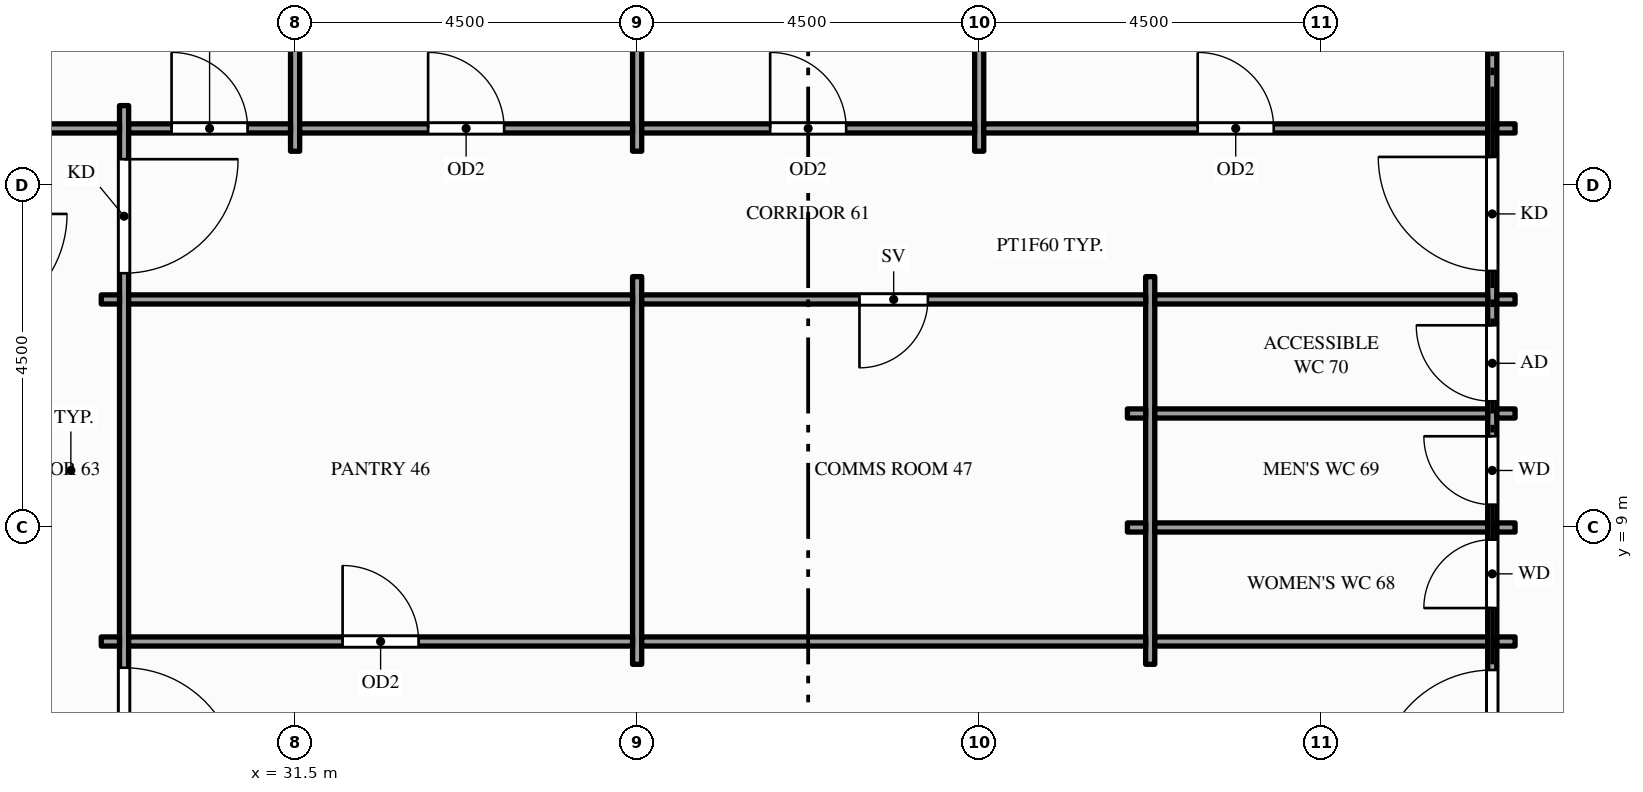
"""IFC4 building model, lengths in metres.
Left out: names, types, materials, properties, quantities, classifications, styles, units other than length and angle.
Written with IfcOpenShell. Run it as: python <this file> out.ifc"""

import sys

from ifc_helpers import new_model, si_unit, direction, frame, frame_2d, origin, place, context, subcontext, project, spatial, rectangle, extrude, element, fill, save


model = new_model("IFC4")
c1 = context("Model", 3, precision=1e-05, world=origin(), true_north=direction((0.0, 1.0)))
c2 = subcontext(c1, "Body", "Model", "MODEL_VIEW")
j1 = project(units=[si_unit("LENGTHUNIT", "METRE"), si_unit("PLANEANGLEUNIT", "RADIAN")], contexts=[c1])
p1 = place(None, origin())
s1 = spatial("IfcSite", under=j1, at=p1, CompositionType="ELEMENT")
p2 = place(p1, origin())
s2 = spatial("IfcBuilding", under=s1, at=p2, CompositionType="ELEMENT")
p3 = place(p2, frame((0.0, 0.0, 207.0)))
s3 = spatial("IfcBuildingStorey", under=s2, at=p3, CompositionType="ELEMENT", Elevation=207.0)
p4 = place(p3, frame((29.25, 4.95, 0.0), z_axis=(0.0, 0.0, 1.0), x_axis=(0.0, 1.0, 0.0)))
e1 = element("IfcWall", 1, at=p4, inside=s3, PredefinedType="PARTITIONING", context=c2, shape_type="SweptSolid", body=[
    extrude(rectangle(XDim=9.6, YDim=0.12, at=frame_2d((4.8, 0.0))), origin(), (0.0, 0.0, 1.0), 2.87),
])
p5 = place(p4, frame((0.705, 0.0, 0.0)))
e2 = element("IfcOpeningElement", 2, at=p5, cuts=e1, PredefinedType="OPENING", context=c2, shape_type="SweptSolid", body=[
    extrude(rectangle(XDim=1.5, YDim=2.1, at=frame_2d((0.75, 1.05))), frame((0.0, 0.07, 0.0), z_axis=(0.0, -1.0, 0.0), x_axis=(1.0, 0.0, 0.0)), (0.0, 0.0, 1.0), 0.14),
])
p6 = place(p4, frame((7.395, 0.0, 0.0)))
e3 = element("IfcOpeningElement", 3, at=p6, cuts=e1, PredefinedType="OPENING", context=c2, shape_type="SweptSolid", body=[
    extrude(rectangle(XDim=1.5, YDim=2.1, at=frame_2d((0.75, 1.05))), frame((0.0, 0.07, 0.0), z_axis=(0.0, -1.0, 0.0), x_axis=(1.0, 0.0, 0.0)), (0.0, 0.0, 1.0), 0.14),
])
p7 = place(p3, frame((31.5, 13.95, 0.0), z_axis=(0.0, 0.0, 1.0), x_axis=(0.0, 1.0, 0.0)))
e4 = element("IfcWall", 4, at=p7, inside=s3, PredefinedType="PARTITIONING", context=c2, shape_type="SweptSolid", body=[
    extrude(rectangle(XDim=6.9, YDim=0.12, at=frame_2d((3.45, 0.0))), origin(), (0.0, 0.0, 1.0), 2.87),
])
p8 = place(p3, frame((36.0, 7.2, 0.0), z_axis=(0.0, 0.0, 1.0), x_axis=(0.0, 1.0, 0.0)))
e5 = element("IfcWall", 5, at=p8, inside=s3, PredefinedType="PARTITIONING", context=c2, shape_type="SweptSolid", body=[
    extrude(rectangle(XDim=5.1, YDim=0.12, at=frame_2d((2.55, 0.0))), origin(), (0.0, 0.0, 1.0), 2.87),
])
for number, where, z_axis, x_axis in (
    (6, (36.0, 13.95, 0.0), (0.0, 0.0, 1.0), (0.0, 1.0, 0.0)),
    (7, (40.5, 13.95, 0.0), (0.0, 0.0, 1.0), (0.0, 1.0, 0.0)),
):
    element("IfcWall", number, at=place(p3, frame(where, z_axis=z_axis, x_axis=x_axis)), inside=s3, PredefinedType="PARTITIONING", context=c2, shape_type="SweptSolid", body=[
        extrude(rectangle(XDim=6.9, YDim=0.12, at=frame_2d((3.45, 0.0))), origin(), (0.0, 0.0, 1.0), 2.87),
    ])
p9 = place(p3, frame((42.75, 7.2, 0.0), z_axis=(0.0, 0.0, 1.0), x_axis=(0.0, 1.0, 0.0)))
e8 = element("IfcWall", 8, at=p9, inside=s3, PredefinedType="PARTITIONING", context=c2, shape_type="SweptSolid", body=[
    extrude(rectangle(XDim=5.1, YDim=0.12, at=frame_2d((2.55, 0.0))), origin(), (0.0, 0.0, 1.0), 2.87),
])
p10 = place(p3, frame((47.25, -1.35, 0.0), z_axis=(0.0, 0.0, 1.0), x_axis=(0.0, 1.0, 0.0)))
e9 = element("IfcWall", 9, at=p10, inside=s3, PredefinedType="PARTITIONING", context=c2, shape_type="SweptSolid", body=[
    extrude(rectangle(XDim=22.2, YDim=0.12, at=frame_2d((11.1, 0.0))), origin(), (0.0, 0.0, 1.0), 2.87),
])
p11 = place(p10, frame((6.975, 0.0, 0.0)))
e10 = element("IfcOpeningElement", 10, at=p11, cuts=e9, PredefinedType="OPENING", context=c2, shape_type="SweptSolid", body=[
    extrude(rectangle(XDim=1.5, YDim=2.1, at=frame_2d((0.75, 1.05))), frame((0.0, 0.07, 0.0), z_axis=(0.0, -1.0, 0.0), x_axis=(1.0, 0.0, 0.0)), (0.0, 0.0, 1.0), 0.14),
])
p12 = place(p10, frame((13.725, 0.0, 0.0)))
e11 = element("IfcOpeningElement", 11, at=p12, cuts=e9, PredefinedType="OPENING", context=c2, shape_type="SweptSolid", body=[
    extrude(rectangle(XDim=1.5, YDim=2.1, at=frame_2d((0.75, 1.05))), frame((0.0, 0.07, 0.0), z_axis=(0.0, -1.0, 0.0), x_axis=(1.0, 0.0, 0.0)), (0.0, 0.0, 1.0), 0.14),
])
p13 = place(p10, frame((9.29, 0.0, 0.0)))
e12 = element("IfcOpeningElement", 12, at=p13, cuts=e9, PredefinedType="OPENING", context=c2, shape_type="SweptSolid", body=[
    extrude(rectangle(XDim=0.9, YDim=2.1, at=frame_2d((0.45, 1.05))), frame((0.0, 0.07, 0.0), z_axis=(0.0, -1.0, 0.0), x_axis=(1.0, 0.0, 0.0)), (0.0, 0.0, 1.0), 0.14),
])
p14 = place(p10, frame((10.65, 0.0, 0.0)))
e13 = element("IfcOpeningElement", 13, at=p14, cuts=e9, PredefinedType="OPENING", context=c2, shape_type="SweptSolid", body=[
    extrude(rectangle(XDim=0.9, YDim=2.1, at=frame_2d((0.45, 1.05))), frame((0.0, 0.07, 0.0), z_axis=(0.0, -1.0, 0.0), x_axis=(1.0, 0.0, 0.0)), (0.0, 0.0, 1.0), 0.14),
])
p15 = place(p10, frame((12.01, 0.0, 0.0)))
e14 = element("IfcOpeningElement", 14, at=p15, cuts=e9, PredefinedType="OPENING", context=c2, shape_type="SweptSolid", body=[
    extrude(rectangle(XDim=1.0, YDim=2.1, at=frame_2d((0.5, 1.05))), frame((0.0, 0.07, 0.0), z_axis=(0.0, -1.0, 0.0), x_axis=(1.0, 0.0, 0.0)), (0.0, 0.0, 1.0), 0.14),
])
p16 = place(p3, frame((28.95, 7.5, 0.0), z_axis=(0.0, 0.0, 1.0), x_axis=(1.0, 0.0, 0.0)))
e15 = element("IfcWall", 15, at=p16, inside=s3, PredefinedType="PARTITIONING", context=c2, shape_type="SweptSolid", body=[
    extrude(rectangle(XDim=0.24, YDim=0.12, at=frame_2d((0.12, 0.0))), origin(), (0.0, 0.0, 1.0), 2.87),
])
p17 = place(p3, frame((29.31, 7.5, 0.0), z_axis=(0.0, 0.0, 1.0), x_axis=(1.0, 0.0, 0.0)))
e16 = element("IfcWall", 16, at=p17, inside=s3, PredefinedType="PARTITIONING", context=c2, shape_type="SweptSolid", body=[
    extrude(rectangle(XDim=6.63, YDim=0.12, at=frame_2d((3.315, 0.0))), origin(), (0.0, 0.0, 1.0), 2.87),
])
p18 = place(p17, frame((2.815, 0.0, 0.0)))
e17 = element("IfcOpeningElement", 17, at=p18, cuts=e16, PredefinedType="OPENING", context=c2, shape_type="SweptSolid", body=[
    extrude(rectangle(XDim=1.0, YDim=2.1, at=frame_2d((0.5, 1.05))), frame((0.0, 0.07, 0.0), z_axis=(0.0, -1.0, 0.0), x_axis=(1.0, 0.0, 0.0)), (0.0, 0.0, 1.0), 0.14),
])
p19 = place(p3, frame((36.06, 7.5, 0.0), z_axis=(0.0, 0.0, 1.0), x_axis=(1.0, 0.0, 0.0)))
e18 = element("IfcWall", 18, at=p19, inside=s3, PredefinedType="PARTITIONING", context=c2, shape_type="SweptSolid", body=[
    extrude(rectangle(XDim=6.63, YDim=0.12, at=frame_2d((3.315, 0.0))), origin(), (0.0, 0.0, 1.0), 2.87),
])
p20 = place(p3, frame((42.81, 7.5, 0.0), z_axis=(0.0, 0.0, 1.0), x_axis=(1.0, 0.0, 0.0)))
e19 = element("IfcWall", 19, at=p20, inside=s3, PredefinedType="PARTITIONING", context=c2, shape_type="SweptSolid", body=[
    extrude(rectangle(XDim=4.38, YDim=0.12, at=frame_2d((2.19, 0.0))), origin(), (0.0, 0.0, 1.0), 2.87),
])
for number, where, z_axis, x_axis in (
    (20, (47.31, 7.5, 0.0), (0.0, 0.0, 1.0), (1.0, 0.0, 0.0)),
    (21, (42.45, 9.0, 0.0), (0.0, 0.0, 1.0), (1.0, 0.0, 0.0)),
):
    element("IfcWall", number, at=place(p3, frame(where, z_axis=z_axis, x_axis=x_axis)), inside=s3, PredefinedType="PARTITIONING", context=c2, shape_type="SweptSolid", body=[
        extrude(rectangle(XDim=0.24, YDim=0.12, at=frame_2d((0.12, 0.0))), origin(), (0.0, 0.0, 1.0), 2.87),
    ])
p21 = place(p3, frame((42.81, 9.0, 0.0), z_axis=(0.0, 0.0, 1.0), x_axis=(1.0, 0.0, 0.0)))
e22 = element("IfcWall", 22, at=p21, inside=s3, PredefinedType="PARTITIONING", context=c2, shape_type="SweptSolid", body=[
    extrude(rectangle(XDim=4.38, YDim=0.12, at=frame_2d((2.19, 0.0))), origin(), (0.0, 0.0, 1.0), 2.87),
])
for number, where, z_axis, x_axis in (
    (23, (47.31, 9.0, 0.0), (0.0, 0.0, 1.0), (1.0, 0.0, 0.0)),
    (24, (42.45, 10.5, 0.0), (0.0, 0.0, 1.0), (1.0, 0.0, 0.0)),
):
    element("IfcWall", number, at=place(p3, frame(where, z_axis=z_axis, x_axis=x_axis)), inside=s3, PredefinedType="PARTITIONING", context=c2, shape_type="SweptSolid", body=[
        extrude(rectangle(XDim=0.24, YDim=0.12, at=frame_2d((0.12, 0.0))), origin(), (0.0, 0.0, 1.0), 2.87),
    ])
p22 = place(p3, frame((42.81, 10.5, 0.0), z_axis=(0.0, 0.0, 1.0), x_axis=(1.0, 0.0, 0.0)))
e25 = element("IfcWall", 25, at=p22, inside=s3, PredefinedType="PARTITIONING", context=c2, shape_type="SweptSolid", body=[
    extrude(rectangle(XDim=4.38, YDim=0.12, at=frame_2d((2.19, 0.0))), origin(), (0.0, 0.0, 1.0), 2.87),
])
for number, where, z_axis, x_axis in (
    (26, (47.31, 10.5, 0.0), (0.0, 0.0, 1.0), (1.0, 0.0, 0.0)),
    (27, (28.95, 12.0, 0.0), (0.0, 0.0, 1.0), (1.0, 0.0, 0.0)),
):
    element("IfcWall", number, at=place(p3, frame(where, z_axis=z_axis, x_axis=x_axis)), inside=s3, PredefinedType="PARTITIONING", context=c2, shape_type="SweptSolid", body=[
        extrude(rectangle(XDim=0.24, YDim=0.12, at=frame_2d((0.12, 0.0))), origin(), (0.0, 0.0, 1.0), 2.87),
    ])
p23 = place(p3, frame((29.31, 12.0, 0.0), z_axis=(0.0, 0.0, 1.0), x_axis=(1.0, 0.0, 0.0)))
e28 = element("IfcWall", 28, at=p23, inside=s3, PredefinedType="PARTITIONING", context=c2, shape_type="SweptSolid", body=[
    extrude(rectangle(XDim=6.63, YDim=0.12, at=frame_2d((3.315, 0.0))), origin(), (0.0, 0.0, 1.0), 2.87),
])
p24 = place(p3, frame((36.06, 12.0, 0.0), z_axis=(0.0, 0.0, 1.0), x_axis=(1.0, 0.0, 0.0)))
e29 = element("IfcWall", 29, at=p24, inside=s3, PredefinedType="PARTITIONING", context=c2, shape_type="SweptSolid", body=[
    extrude(rectangle(XDim=6.63, YDim=0.12, at=frame_2d((3.315, 0.0))), origin(), (0.0, 0.0, 1.0), 2.87),
])
p25 = place(p24, frame((2.865, 0.0, 0.0)))
e30 = element("IfcOpeningElement", 30, at=p25, cuts=e29, PredefinedType="OPENING", context=c2, shape_type="SweptSolid", body=[
    extrude(rectangle(XDim=0.9, YDim=2.1, at=frame_2d((0.45, 1.05))), frame((0.0, 0.07, 0.0), z_axis=(0.0, -1.0, 0.0), x_axis=(1.0, 0.0, 0.0)), (0.0, 0.0, 1.0), 0.14),
])
p26 = place(p3, frame((42.81, 12.0, 0.0), z_axis=(0.0, 0.0, 1.0), x_axis=(1.0, 0.0, 0.0)))
e31 = element("IfcWall", 31, at=p26, inside=s3, PredefinedType="PARTITIONING", context=c2, shape_type="SweptSolid", body=[
    extrude(rectangle(XDim=4.38, YDim=0.12, at=frame_2d((2.19, 0.0))), origin(), (0.0, 0.0, 1.0), 2.87),
])
p27 = place(p3, frame((47.31, 12.0, 0.0), z_axis=(0.0, 0.0, 1.0), x_axis=(1.0, 0.0, 0.0)))
e32 = element("IfcWall", 32, at=p27, inside=s3, PredefinedType="PARTITIONING", context=c2, shape_type="SweptSolid", body=[
    extrude(rectangle(XDim=0.24, YDim=0.12, at=frame_2d((0.12, 0.0))), origin(), (0.0, 0.0, 1.0), 2.87),
])
p28 = place(p3, frame((27.06, 14.25, 0.0), z_axis=(0.0, 0.0, 1.0), x_axis=(1.0, 0.0, 0.0)))
e33 = element("IfcWall", 33, at=p28, inside=s3, PredefinedType="PARTITIONING", context=c2, shape_type="SweptSolid", body=[
    extrude(rectangle(XDim=2.13, YDim=0.12, at=frame_2d((1.065, 0.0))), origin(), (0.0, 0.0, 1.0), 2.87),
])
p29 = place(p3, frame((29.31, 14.25, 0.0), z_axis=(0.0, 0.0, 1.0), x_axis=(1.0, 0.0, 0.0)))
e34 = element("IfcWall", 34, at=p29, inside=s3, PredefinedType="PARTITIONING", context=c2, shape_type="SweptSolid", body=[
    extrude(rectangle(XDim=2.13, YDim=0.12, at=frame_2d((1.065, 0.0))), origin(), (0.0, 0.0, 1.0), 2.87),
])
p30 = place(p29, frame((0.565, 0.0, 0.0)))
e35 = element("IfcOpeningElement", 35, at=p30, cuts=e34, PredefinedType="OPENING", context=c2, shape_type="SweptSolid", body=[
    extrude(rectangle(XDim=1.0, YDim=2.1, at=frame_2d((0.5, 1.05))), frame((0.0, 0.07, 0.0), z_axis=(0.0, -1.0, 0.0), x_axis=(1.0, 0.0, 0.0)), (0.0, 0.0, 1.0), 0.14),
])
p31 = place(p3, frame((31.56, 14.25, 0.0), z_axis=(0.0, 0.0, 1.0), x_axis=(1.0, 0.0, 0.0)))
e36 = element("IfcWall", 36, at=p31, inside=s3, PredefinedType="PARTITIONING", context=c2, shape_type="SweptSolid", body=[
    extrude(rectangle(XDim=4.38, YDim=0.12, at=frame_2d((2.19, 0.0))), origin(), (0.0, 0.0, 1.0), 2.87),
])
p32 = place(p31, frame((1.69, 0.0, 0.0)))
e37 = element("IfcOpeningElement", 37, at=p32, cuts=e36, PredefinedType="OPENING", context=c2, shape_type="SweptSolid", body=[
    extrude(rectangle(XDim=1.0, YDim=2.1, at=frame_2d((0.5, 1.05))), frame((0.0, 0.07, 0.0), z_axis=(0.0, -1.0, 0.0), x_axis=(1.0, 0.0, 0.0)), (0.0, 0.0, 1.0), 0.14),
])
p33 = place(p3, frame((36.06, 14.25, 0.0), z_axis=(0.0, 0.0, 1.0), x_axis=(1.0, 0.0, 0.0)))
e38 = element("IfcWall", 38, at=p33, inside=s3, PredefinedType="PARTITIONING", context=c2, shape_type="SweptSolid", body=[
    extrude(rectangle(XDim=4.38, YDim=0.12, at=frame_2d((2.19, 0.0))), origin(), (0.0, 0.0, 1.0), 2.87),
])
p34 = place(p33, frame((1.69, 0.0, 0.0)))
e39 = element("IfcOpeningElement", 39, at=p34, cuts=e38, PredefinedType="OPENING", context=c2, shape_type="SweptSolid", body=[
    extrude(rectangle(XDim=1.0, YDim=2.1, at=frame_2d((0.5, 1.05))), frame((0.0, 0.07, 0.0), z_axis=(0.0, -1.0, 0.0), x_axis=(1.0, 0.0, 0.0)), (0.0, 0.0, 1.0), 0.14),
])
p35 = place(p3, frame((40.56, 14.25, 0.0), z_axis=(0.0, 0.0, 1.0), x_axis=(1.0, 0.0, 0.0)))
e40 = element("IfcWall", 40, at=p35, inside=s3, PredefinedType="PARTITIONING", context=c2, shape_type="SweptSolid", body=[
    extrude(rectangle(XDim=6.63, YDim=0.12, at=frame_2d((3.315, 0.0))), origin(), (0.0, 0.0, 1.0), 2.87),
])
p36 = place(p35, frame((2.815, 0.0, 0.0)))
e41 = element("IfcOpeningElement", 41, at=p36, cuts=e40, PredefinedType="OPENING", context=c2, shape_type="SweptSolid", body=[
    extrude(rectangle(XDim=1.0, YDim=2.1, at=frame_2d((0.5, 1.05))), frame((0.0, 0.07, 0.0), z_axis=(0.0, -1.0, 0.0), x_axis=(1.0, 0.0, 0.0)), (0.0, 0.0, 1.0), 0.14),
])
p37 = place(p3, frame((47.31, 14.25, 0.0), z_axis=(0.0, 0.0, 1.0), x_axis=(1.0, 0.0, 0.0)))
e42 = element("IfcWall", 42, at=p37, inside=s3, PredefinedType="PARTITIONING", context=c2, shape_type="SweptSolid", body=[
    extrude(rectangle(XDim=0.24, YDim=0.12, at=frame_2d((0.12, 0.0))), origin(), (0.0, 0.0, 1.0), 2.87),
])
p38 = place(p5, origin())
e43 = element("IfcDoor", 43, at=p38, inside=s3, OperationType="SINGLE_SWING_LEFT", PredefinedType="DOOR", context=c2, shape_type="SweptSolid", body=[
    extrude(rectangle(XDim=1.5, YDim=2.1, at=frame_2d((0.75, 1.05))), frame((0.0, 0.025, 0.0), z_axis=(0.0, -1.0, 0.0), x_axis=(1.0, 0.0, 0.0)), (0.0, 0.0, 1.0), 0.05),
])
fill(e2, e43)
p39 = place(p6, origin())
e44 = element("IfcDoor", 44, at=p39, inside=s3, OperationType="SINGLE_SWING_RIGHT", PredefinedType="DOOR", context=c2, shape_type="SweptSolid", body=[
    extrude(rectangle(XDim=1.5, YDim=2.1, at=frame_2d((0.75, 1.05))), frame((0.0, 0.025, 0.0), z_axis=(0.0, -1.0, 0.0), x_axis=(1.0, 0.0, 0.0)), (0.0, 0.0, 1.0), 0.05),
])
fill(e3, e44)
p40 = place(p11, origin())
e45 = element("IfcDoor", 45, at=p40, inside=s3, OperationType="SINGLE_SWING_LEFT", PredefinedType="DOOR", context=c2, shape_type="SweptSolid", body=[
    extrude(rectangle(XDim=1.5, YDim=2.1, at=frame_2d((0.75, 1.05))), frame((0.0, 0.025, 0.0), z_axis=(0.0, -1.0, 0.0), x_axis=(1.0, 0.0, 0.0)), (0.0, 0.0, 1.0), 0.05),
])
fill(e10, e45)
p41 = place(p12, origin())
e46 = element("IfcDoor", 46, at=p41, inside=s3, OperationType="SINGLE_SWING_RIGHT", PredefinedType="DOOR", context=c2, shape_type="SweptSolid", body=[
    extrude(rectangle(XDim=1.5, YDim=2.1, at=frame_2d((0.75, 1.05))), frame((0.0, 0.025, 0.0), z_axis=(0.0, -1.0, 0.0), x_axis=(1.0, 0.0, 0.0)), (0.0, 0.0, 1.0), 0.05),
])
fill(e11, e46)
p42 = place(p18, origin())
e47 = element("IfcDoor", 47, at=p42, inside=s3, OperationType="SINGLE_SWING_LEFT", PredefinedType="DOOR", context=c2, shape_type="SweptSolid", body=[
    extrude(rectangle(XDim=1.0, YDim=2.1, at=frame_2d((0.5, 1.05))), frame((0.0, 0.025, 0.0), z_axis=(0.0, -1.0, 0.0), x_axis=(1.0, 0.0, 0.0)), (0.0, 0.0, 1.0), 0.05),
])
fill(e17, e47)
p43 = place(p25, origin())
e48 = element("IfcDoor", 48, at=p43, inside=s3, OperationType="SINGLE_SWING_LEFT", PredefinedType="DOOR", context=c2, shape_type="SweptSolid", body=[
    extrude(rectangle(XDim=0.9, YDim=2.1, at=frame_2d((0.45, 1.05))), frame((0.0, 0.025, 0.0), z_axis=(0.0, -1.0, 0.0), x_axis=(1.0, 0.0, 0.0)), (0.0, 0.0, 1.0), 0.05),
])
fill(e30, e48)
p44 = place(p13, origin())
e49 = element("IfcDoor", 49, at=p44, inside=s3, OperationType="SINGLE_SWING_LEFT", PredefinedType="DOOR", context=c2, shape_type="SweptSolid", body=[
    extrude(rectangle(XDim=0.9, YDim=2.1, at=frame_2d((0.45, 1.05))), frame((0.0, 0.025, 0.0), z_axis=(0.0, -1.0, 0.0), x_axis=(1.0, 0.0, 0.0)), (0.0, 0.0, 1.0), 0.05),
])
fill(e12, e49)
p45 = place(p14, origin())
e50 = element("IfcDoor", 50, at=p45, inside=s3, OperationType="SINGLE_SWING_RIGHT", PredefinedType="DOOR", context=c2, shape_type="SweptSolid", body=[
    extrude(rectangle(XDim=0.9, YDim=2.1, at=frame_2d((0.45, 1.05))), frame((0.0, 0.025, 0.0), z_axis=(0.0, -1.0, 0.0), x_axis=(1.0, 0.0, 0.0)), (0.0, 0.0, 1.0), 0.05),
])
fill(e13, e50)
p46 = place(p15, origin())
e51 = element("IfcDoor", 51, at=p46, inside=s3, OperationType="SINGLE_SWING_RIGHT", PredefinedType="DOOR", context=c2, shape_type="SweptSolid", body=[
    extrude(rectangle(XDim=1.0, YDim=2.1, at=frame_2d((0.5, 1.05))), frame((0.0, 0.025, 0.0), z_axis=(0.0, -1.0, 0.0), x_axis=(1.0, 0.0, 0.0)), (0.0, 0.0, 1.0), 0.05),
])
fill(e14, e51)
p47 = place(p30, origin())
e52 = element("IfcDoor", 52, at=p47, inside=s3, OperationType="SINGLE_SWING_LEFT", PredefinedType="DOOR", context=c2, shape_type="SweptSolid", body=[
    extrude(rectangle(XDim=1.0, YDim=2.1, at=frame_2d((0.5, 1.05))), frame((0.0, 0.025, 0.0), z_axis=(0.0, -1.0, 0.0), x_axis=(1.0, 0.0, 0.0)), (0.0, 0.0, 1.0), 0.05),
])
fill(e35, e52)
p48 = place(p32, origin())
e53 = element("IfcDoor", 53, at=p48, inside=s3, OperationType="SINGLE_SWING_LEFT", PredefinedType="DOOR", context=c2, shape_type="SweptSolid", body=[
    extrude(rectangle(XDim=1.0, YDim=2.1, at=frame_2d((0.5, 1.05))), frame((0.0, 0.025, 0.0), z_axis=(0.0, -1.0, 0.0), x_axis=(1.0, 0.0, 0.0)), (0.0, 0.0, 1.0), 0.05),
])
fill(e37, e53)
p49 = place(p34, origin())
e54 = element("IfcDoor", 54, at=p49, inside=s3, OperationType="SINGLE_SWING_LEFT", PredefinedType="DOOR", context=c2, shape_type="SweptSolid", body=[
    extrude(rectangle(XDim=1.0, YDim=2.1, at=frame_2d((0.5, 1.05))), frame((0.0, 0.025, 0.0), z_axis=(0.0, -1.0, 0.0), x_axis=(1.0, 0.0, 0.0)), (0.0, 0.0, 1.0), 0.05),
])
fill(e39, e54)
p50 = place(p36, origin())
e55 = element("IfcDoor", 55, at=p50, inside=s3, OperationType="SINGLE_SWING_LEFT", PredefinedType="DOOR", context=c2, shape_type="SweptSolid", body=[
    extrude(rectangle(XDim=1.0, YDim=2.1, at=frame_2d((0.5, 1.05))), frame((0.0, 0.025, 0.0), z_axis=(0.0, -1.0, 0.0), x_axis=(1.0, 0.0, 0.0)), (0.0, 0.0, 1.0), 0.05),
])
fill(e41, e55)
save(model, sys.argv[1])
